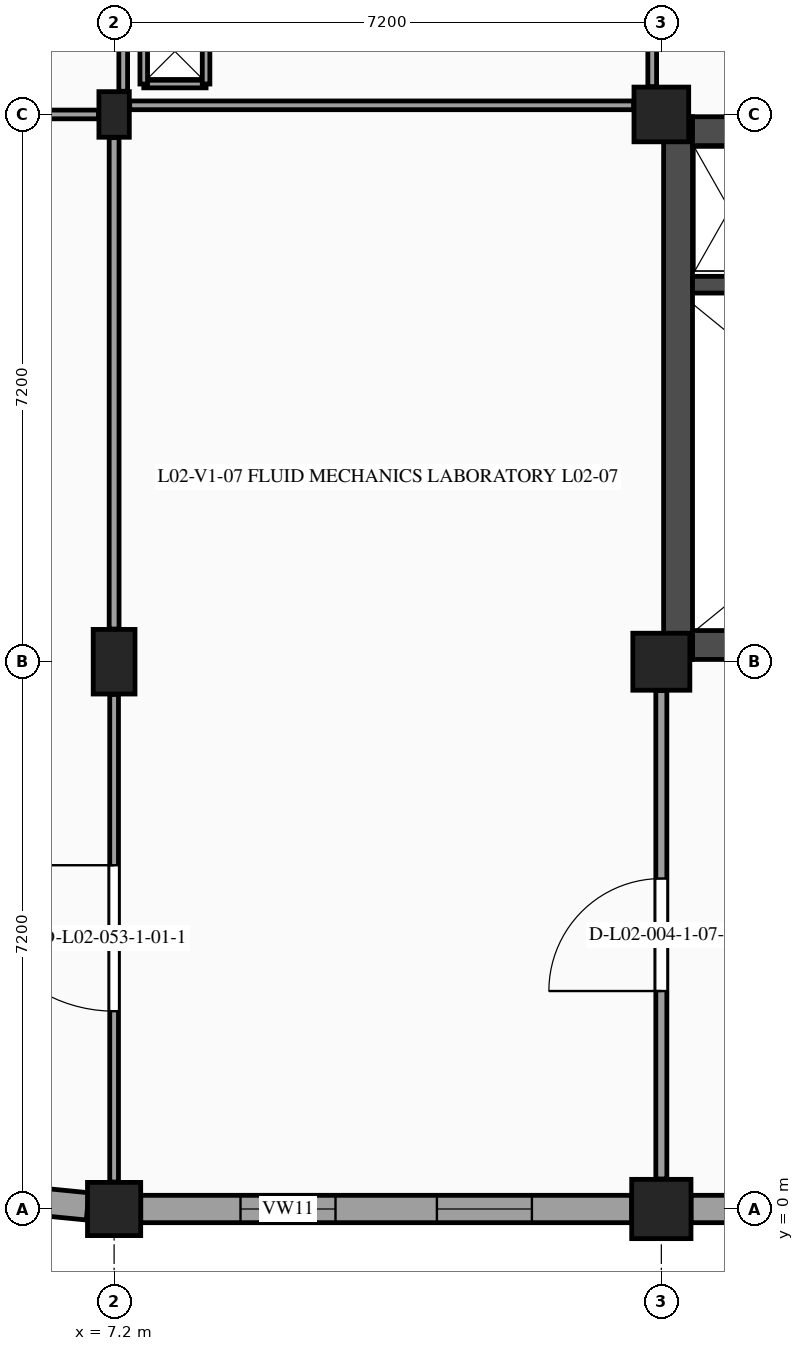
"""IFC4 building model, lengths in metres.
Left out: names, types, materials, properties, quantities, classifications, styles, units other than length and angle.
Written with IfcOpenShell. Run it as: python <this file> out.ifc"""

import sys

from ifc_helpers import new_model, si_unit, direction, frame, frame_2d, origin, origin_2d, place, context, subcontext, project, spatial, rectangle, extrude, element, fill, save


model = new_model("IFC4")
c1 = context("Model", 3, precision=1e-05, world=origin(), true_north=direction((0.0, 1.0)))
c2 = subcontext(c1, "Body", "Model", "MODEL_VIEW")
j1 = project(units=[si_unit("LENGTHUNIT", "METRE"), si_unit("PLANEANGLEUNIT", "RADIAN")], contexts=[c1])
p1 = place(None, origin())
s1 = spatial("IfcSite", under=j1, at=p1, CompositionType="ELEMENT")
p2 = place(p1, origin())
s2 = spatial("IfcBuilding", under=s1, at=p2, CompositionType="ELEMENT")
p3 = place(p2, frame((0.0, 0.0, 9.9)))
s3 = spatial("IfcBuildingStorey", under=s2, at=p3, CompositionType="ELEMENT", Elevation=9.9)
p4 = place(p3, frame((7.2, 0.0, 0.0), z_axis=(0.0, 0.0, 1.0), x_axis=(1.0, 0.0, 0.0)))
e1 = element("IfcColumn", 1, at=p4, inside=s3, PredefinedType="COLUMN", context=c2, shape_type="SweptSolid", body=[
    extrude(rectangle(XDim=0.7, YDim=0.7, at=origin_2d()), origin(), (0.0, 0.0, 1.0), 4.5),
])
p5 = place(p3, frame((7.2, 7.2, 0.0), z_axis=(0.0, 0.0, 1.0), x_axis=(1.0, 0.0, 0.0)))
e2 = element("IfcColumn", 2, at=p5, inside=s3, PredefinedType="COLUMN", context=c2, shape_type="SweptSolid", body=[
    extrude(rectangle(XDim=0.55, YDim=0.85, at=origin_2d()), origin(), (0.0, 0.0, 1.0), 4.5),
])
p6 = place(p3, frame((7.2, 14.4, 0.0), z_axis=(0.0, 0.0, 1.0), x_axis=(1.0, 0.0, 0.0)))
e3 = element("IfcColumn", 3, at=p6, inside=s3, PredefinedType="PILASTER", context=c2, shape_type="SweptSolid", body=[
    extrude(rectangle(XDim=0.4, YDim=0.6, at=origin_2d()), origin(), (0.0, 0.0, 1.0), 4.5),
])
p7 = place(p3, frame((14.4, 0.0, 0.0), z_axis=(0.0, 0.0, 1.0), x_axis=(1.0, 0.0, 0.0)))
e4 = element("IfcColumn", 4, at=p7, inside=s3, PredefinedType="COLUMN", context=c2, shape_type="SweptSolid", body=[
    extrude(rectangle(XDim=0.78, YDim=0.78, at=origin_2d()), origin(), (0.0, 0.0, 1.0), 4.5),
])
p8 = place(p3, frame((14.4, 7.2, 0.0), z_axis=(0.0, 0.0, 1.0), x_axis=(1.0, 0.0, 0.0)))
e5 = element("IfcColumn", 5, at=p8, inside=s3, PredefinedType="COLUMN", context=c2, shape_type="SweptSolid", body=[
    extrude(rectangle(XDim=0.75, YDim=0.75, at=origin_2d()), origin(), (0.0, 0.0, 1.0), 4.5),
])
p9 = place(p3, frame((14.4, 14.4, 0.0), z_axis=(0.0, 0.0, 1.0), x_axis=(1.0, 0.0, 0.0)))
e6 = element("IfcColumn", 6, at=p9, inside=s3, PredefinedType="COLUMN", context=c2, shape_type="SweptSolid", body=[
    extrude(rectangle(XDim=0.72, YDim=0.72, at=origin_2d()), origin(), (0.0, 0.0, 1.0), 4.5),
])
p10 = place(p3, frame((21.25, 0.0, 0.0), z_axis=(0.0, 0.0, 1.0), x_axis=(-1.0, 0.0, 0.0)))
e7 = element("IfcWall", 7, at=p10, inside=s3, PredefinedType="STANDARD", context=c2, shape_type="SweptSolid", body=[
    extrude(rectangle(XDim=6.46, YDim=0.36, at=frame_2d((3.23, 0.0))), origin(), (0.0, 0.0, 1.0), 3.47),
])
p11 = place(p10, frame((1.238, 0.0, 1.15)))
e8 = element("IfcOpeningElement", 8, at=p11, cuts=e7, PredefinedType="OPENING", context=c2, shape_type="SweptSolid", body=[
    extrude(rectangle(XDim=1.4, YDim=1.3, at=frame_2d((0.7, 0.65))), frame((0.0, 0.19, 0.0), z_axis=(0.0, -1.0, 0.0), x_axis=(1.0, 0.0, 0.0)), (0.0, 0.0, 1.0), 0.38),
])
p12 = place(p10, frame((3.822, 0.0, 1.15)))
e9 = element("IfcOpeningElement", 9, at=p12, cuts=e7, PredefinedType="OPENING", context=c2, shape_type="SweptSolid", body=[
    extrude(rectangle(XDim=1.4, YDim=1.3, at=frame_2d((0.7, 0.65))), frame((0.0, 0.19, 0.0), z_axis=(0.0, -1.0, 0.0), x_axis=(1.0, 0.0, 0.0)), (0.0, 0.0, 1.0), 0.38),
])
p13 = place(p3, frame((14.01, 0.0, 0.0), z_axis=(0.0, 0.0, 1.0), x_axis=(-1.0, 0.0, 0.0)))
e10 = element("IfcWall", 10, at=p13, inside=s3, PredefinedType="STANDARD", context=c2, shape_type="SweptSolid", body=[
    extrude(rectangle(XDim=6.46, YDim=0.36, at=frame_2d((3.23, 0.0))), origin(), (0.0, 0.0, 1.0), 3.47),
])
p14 = place(p13, frame((1.313, 0.0, 1.15)))
e11 = element("IfcOpeningElement", 11, at=p14, cuts=e10, PredefinedType="OPENING", context=c2, shape_type="SweptSolid", body=[
    extrude(rectangle(XDim=1.25, YDim=1.25, at=frame_2d((0.625, 0.625))), frame((0.0, 0.19, 0.0), z_axis=(0.0, -1.0, 0.0), x_axis=(1.0, 0.0, 0.0)), (0.0, 0.0, 1.0), 0.38),
])
p15 = place(p13, frame((3.897, 0.0, 1.15)))
e12 = element("IfcOpeningElement", 12, at=p15, cuts=e10, PredefinedType="OPENING", context=c2, shape_type="SweptSolid", body=[
    extrude(rectangle(XDim=1.25, YDim=1.25, at=frame_2d((0.625, 0.625))), frame((0.0, 0.19, 0.0), z_axis=(0.0, -1.0, 0.0), x_axis=(1.0, 0.0, 0.0)), (0.0, 0.0, 1.0), 0.38),
])
p16 = place(p3, frame((6.852, 0.034, 0.0), z_axis=(0.0, 0.0, 1.0), x_axis=(-0.995188591484, 0.097977892298, 0.0)))
e13 = element("IfcWall", 13, at=p16, inside=s3, PredefinedType="STANDARD", context=c2, shape_type="SweptSolid", body=[
    extrude(rectangle(XDim=1.062, YDim=0.36, at=frame_2d((0.531, 0.0))), origin(), (0.0, 0.0, 1.0), 4.225),
])
p17 = place(p3, frame((14.81, 7.42, 0.0), z_axis=(0.0, 0.0, 1.0), x_axis=(1.0, 0.0, 0.0)))
e14 = element("IfcWall", 14, at=p17, inside=s3, PredefinedType="SHEAR", context=c2, shape_type="SweptSolid", body=[
    extrude(rectangle(XDim=6.6, YDim=0.38, at=frame_2d((3.3, 0.0))), origin(), (0.0, 0.0, 1.0), 4.225),
])
p18 = place(p3, frame((14.62, 14.37, 0.0), z_axis=(0.0, 0.0, 1.0), x_axis=(0.0, -1.0, 0.0)))
e15 = element("IfcWall", 15, at=p18, inside=s3, PredefinedType="SHEAR", context=c2, shape_type="SweptSolid", body=[
    extrude(rectangle(XDim=7.14, YDim=0.38, at=frame_2d((3.57, 0.0))), origin(), (0.0, 0.0, 1.0), 4.225),
])
p19 = place(p3, frame((14.81, 14.18, 0.0), z_axis=(0.0, 0.0, 1.0), x_axis=(1.0, 0.0, 0.0)))
e16 = element("IfcWall", 16, at=p19, inside=s3, PredefinedType="SHEAR", context=c2, shape_type="SweptSolid", body=[
    extrude(rectangle(XDim=6.6, YDim=0.38, at=frame_2d((3.3, 0.0))), origin(), (0.0, 0.0, 1.0), 4.225),
])
p20 = place(p19, frame((1.42, 0.0, 0.0)))
e17 = element("IfcOpeningElement", 17, at=p20, cuts=e16, PredefinedType="OPENING", context=c2, shape_type="SweptSolid", body=[
    extrude(rectangle(XDim=0.85, YDim=2.1, at=frame_2d((0.425, 1.05))), frame((0.0, 0.2, 0.0), z_axis=(0.0, -1.0, 0.0), x_axis=(1.0, 0.0, 0.0)), (0.0, 0.0, 1.0), 0.4),
])
p21 = place(p19, frame((3.4, 0.0, 0.0)))
e18 = element("IfcOpeningElement", 18, at=p21, cuts=e16, PredefinedType="OPENING", context=c2, shape_type="SweptSolid", body=[
    extrude(rectangle(XDim=0.95, YDim=2.15, at=frame_2d((0.475, 1.075))), frame((0.0, 0.2, 0.0), z_axis=(0.0, -1.0, 0.0), x_axis=(1.0, 0.0, 0.0)), (0.0, 0.0, 1.0), 0.4),
])
p22 = place(p3, frame((14.81, 12.16, 0.0), z_axis=(0.0, 0.0, 1.0), x_axis=(1.0, 0.0, 0.0)))
e19 = element("IfcWall", 19, at=p22, inside=s3, PredefinedType="SHEAR", context=c2, shape_type="SweptSolid", body=[
    extrude(rectangle(XDim=6.6, YDim=0.22, at=frame_2d((3.3, 0.0))), origin(), (0.0, 0.0, 1.0), 4.225),
])
p23 = place(p3, frame((7.405, 14.52, 0.0), z_axis=(0.0, 0.0, 1.0), x_axis=(1.0, 0.0, 0.0)))
e20 = element("IfcWall", 20, at=p23, inside=s3, PredefinedType="PARTITIONING", context=c2, shape_type="SweptSolid", body=[
    extrude(rectangle(XDim=6.63, YDim=0.115, at=frame_2d((3.315, 0.0))), origin(), (0.0, 0.0, 1.0), 3.5),
])
p24 = place(p3, frame((7.32, 14.705, 0.0), z_axis=(0.0, 0.0, 1.0), x_axis=(0.0, 1.0, 0.0)))
e21 = element("IfcWall", 21, at=p24, inside=s3, PredefinedType="PARTITIONING", context=c2, shape_type="SweptSolid", body=[
    extrude(rectangle(XDim=6.5, YDim=0.115, at=frame_2d((3.25, 0.0))), origin(), (0.0, 0.0, 1.0), 3.53),
])
p25 = place(p3, frame((14.28, 14.765, 0.0), z_axis=(0.0, 0.0, 1.0), x_axis=(0.0, 1.0, 0.0)))
e22 = element("IfcWall", 22, at=p25, inside=s3, PredefinedType="PARTITIONING", context=c2, shape_type="SweptSolid", body=[
    extrude(rectangle(XDim=6.48, YDim=0.115, at=frame_2d((3.24, 0.0))), origin(), (0.0, 0.0, 1.0), 3.53),
])
p26 = place(p25, frame((0.635, 0.0, 0.0)))
e23 = element("IfcOpeningElement", 23, at=p26, cuts=e22, PredefinedType="OPENING", context=c2, shape_type="SweptSolid", body=[
    extrude(rectangle(XDim=0.95, YDim=2.1, at=frame_2d((0.475, 1.05))), frame((0.0, 0.067, 0.0), z_axis=(0.0, -1.0, 0.0), x_axis=(1.0, 0.0, 0.0)), (0.0, 0.0, 1.0), 0.135),
])
p27 = place(p25, frame((2.735, 0.0, 0.0)))
e24 = element("IfcOpeningElement", 24, at=p27, cuts=e22, PredefinedType="OPENING", context=c2, shape_type="SweptSolid", body=[
    extrude(rectangle(XDim=0.95, YDim=2.1, at=frame_2d((0.475, 1.05))), frame((0.0, 0.067, 0.0), z_axis=(0.0, -1.0, 0.0), x_axis=(1.0, 0.0, 0.0)), (0.0, 0.0, 1.0), 0.135),
])
p28 = place(p25, frame((4.885, 0.0, 0.0)))
e25 = element("IfcOpeningElement", 25, at=p28, cuts=e22, PredefinedType="OPENING", context=c2, shape_type="SweptSolid", body=[
    extrude(rectangle(XDim=1.0, YDim=2.15, at=frame_2d((0.5, 1.075))), frame((0.0, 0.067, 0.0), z_axis=(0.0, -1.0, 0.0), x_axis=(1.0, 0.0, 0.0)), (0.0, 0.0, 1.0), 0.135),
])
p29 = place(p3, frame((7.59, 14.8, 0.0), z_axis=(0.0, 0.0, 1.0), x_axis=(1.0, 0.0, 0.0)))
e26 = element("IfcWall", 26, at=p29, inside=s3, PredefinedType="PARTITIONING", context=c2, shape_type="SweptSolid", body=[
    extrude(rectangle(XDim=0.82, YDim=0.1, at=frame_2d((0.41, 0.0))), origin(), (0.0, 0.0, 1.0), 4.225),
])
for number, where, z_axis, x_axis in (
    (27, (8.41, 14.8, 0.0), (0.0, 0.0, 1.0), (0.0, 1.0, 0.0)),
    (28, (7.59, 15.66, 0.0), (0.0, 0.0, 1.0), (0.0, -1.0, 0.0)),
):
    element("IfcWall", number, at=place(p3, frame(where, z_axis=z_axis, x_axis=x_axis)), inside=s3, PredefinedType="PARTITIONING", context=c2, shape_type="SweptSolid", body=[
        extrude(rectangle(XDim=0.86, YDim=0.1, at=frame_2d((0.43, 0.0))), origin(), (0.0, 0.0, 1.0), 4.225),
    ])
p30 = place(p3, frame((7.2, 0.355, 0.0), z_axis=(0.0, 0.0, 1.0), x_axis=(0.0, 1.0, 0.0)))
e29 = element("IfcWall", 29, at=p30, inside=s3, PredefinedType="PARTITIONING", context=c2, shape_type="SweptSolid", body=[
    extrude(rectangle(XDim=6.415, YDim=0.115, at=frame_2d((3.208, 0.0))), origin(), (0.0, 0.0, 1.0), 3.54),
])
p31 = place(p30, frame((2.248, 0.0, 0.0)))
e30 = element("IfcOpeningElement", 30, at=p31, cuts=e29, PredefinedType="OPENING", context=c2, shape_type="SweptSolid", body=[
    extrude(rectangle(XDim=1.92, YDim=2.35, at=frame_2d((0.96, 1.175))), frame((0.0, 0.067, 0.0), z_axis=(0.0, -1.0, 0.0), x_axis=(1.0, 0.0, 0.0)), (0.0, 0.0, 1.0), 0.135),
])
p32 = place(p3, frame((7.2, 7.63, 0.0), z_axis=(0.0, 0.0, 1.0), x_axis=(0.0, 1.0, 0.0)))
e31 = element("IfcWall", 31, at=p32, inside=s3, PredefinedType="PARTITIONING", context=c2, shape_type="SweptSolid", body=[
    extrude(rectangle(XDim=6.465, YDim=0.13, at=frame_2d((3.232, 0.0))), origin(), (0.0, 0.0, 1.0), 3.535),
])
p33 = place(p3, frame((0.365, 14.4, 0.0), z_axis=(0.0, 0.0, 1.0), x_axis=(1.0, 0.0, 0.0)))
e32 = element("IfcWall", 32, at=p33, inside=s3, PredefinedType="PARTITIONING", context=c2, shape_type="SweptSolid", body=[
    extrude(rectangle(XDim=6.63, YDim=0.115, at=frame_2d((3.315, 0.0))), origin(), (0.0, 0.0, 1.0), 3.485),
])
p34 = place(p33, frame((2.435, 0.0, 0.0)))
e33 = element("IfcOpeningElement", 33, at=p34, cuts=e32, PredefinedType="OPENING", context=c2, shape_type="SweptSolid", body=[
    extrude(rectangle(XDim=1.76, YDim=2.3, at=frame_2d((0.88, 1.15))), frame((0.0, 0.067, 0.0), z_axis=(0.0, -1.0, 0.0), x_axis=(1.0, 0.0, 0.0)), (0.0, 0.0, 1.0), 0.135),
])
p35 = place(p3, frame((14.4, 0.395, 0.0), z_axis=(0.0, 0.0, 1.0), x_axis=(0.0, 1.0, 0.0)))
e34 = element("IfcWall", 34, at=p35, inside=s3, PredefinedType="PARTITIONING", context=c2, shape_type="SweptSolid", body=[
    extrude(rectangle(XDim=6.425, YDim=0.145, at=frame_2d((3.212, 0.0))), origin(), (0.0, 0.0, 1.0), 3.54),
])
p36 = place(p35, frame((2.472, 0.0, 0.0)))
e35 = element("IfcOpeningElement", 35, at=p36, cuts=e34, PredefinedType="OPENING", context=c2, shape_type="SweptSolid", body=[
    extrude(rectangle(XDim=1.48, YDim=2.28, at=frame_2d((0.74, 1.14))), frame((0.0, 0.083, 0.0), z_axis=(0.0, -1.0, 0.0), x_axis=(1.0, 0.0, 0.0)), (0.0, 0.0, 1.0), 0.165),
])
p37 = place(p14, origin())
e36 = element("IfcWindow", 36, at=p37, inside=s3, PartitioningType="SINGLE_PANEL", PredefinedType="WINDOW", context=c2, shape_type="SweptSolid", body=[
    extrude(rectangle(XDim=1.25, YDim=1.25, at=frame_2d((0.625, 0.625))), frame((0.0, -0.08, 0.0), z_axis=(0.0, -1.0, 0.0), x_axis=(1.0, 0.0, 0.0)), (0.0, 0.0, 1.0), 0.06),
])
fill(e11, e36)
p38 = place(p15, origin())
e37 = element("IfcWindow", 37, at=p38, inside=s3, PartitioningType="SINGLE_PANEL", PredefinedType="WINDOW", context=c2, shape_type="SweptSolid", body=[
    extrude(rectangle(XDim=1.25, YDim=1.25, at=frame_2d((0.625, 0.625))), frame((0.0, -0.08, 0.0), z_axis=(0.0, -1.0, 0.0), x_axis=(1.0, 0.0, 0.0)), (0.0, 0.0, 1.0), 0.06),
])
fill(e12, e37)
p39 = place(p36, origin())
e38 = element("IfcDoor", 38, at=p39, inside=s3, OperationType="SINGLE_SWING_LEFT", PredefinedType="DOOR", context=c2, shape_type="SweptSolid", body=[
    extrude(rectangle(XDim=1.48, YDim=2.28, at=frame_2d((0.74, 1.14))), frame((0.0, 0.025, 0.0), z_axis=(0.0, -1.0, 0.0), x_axis=(1.0, 0.0, 0.0)), (0.0, 0.0, 1.0), 0.05),
])
fill(e35, e38)
p40 = place(p31, origin())
e39 = element("IfcDoor", 39, at=p40, inside=s3, OperationType="SINGLE_SWING_RIGHT", PredefinedType="DOOR", context=c2, shape_type="SweptSolid", body=[
    extrude(rectangle(XDim=1.92, YDim=2.35, at=frame_2d((0.96, 1.175))), frame((0.0, 0.025, 0.0), z_axis=(0.0, -1.0, 0.0), x_axis=(1.0, 0.0, 0.0)), (0.0, 0.0, 1.0), 0.05),
])
fill(e30, e39)
save(model, sys.argv[1])
